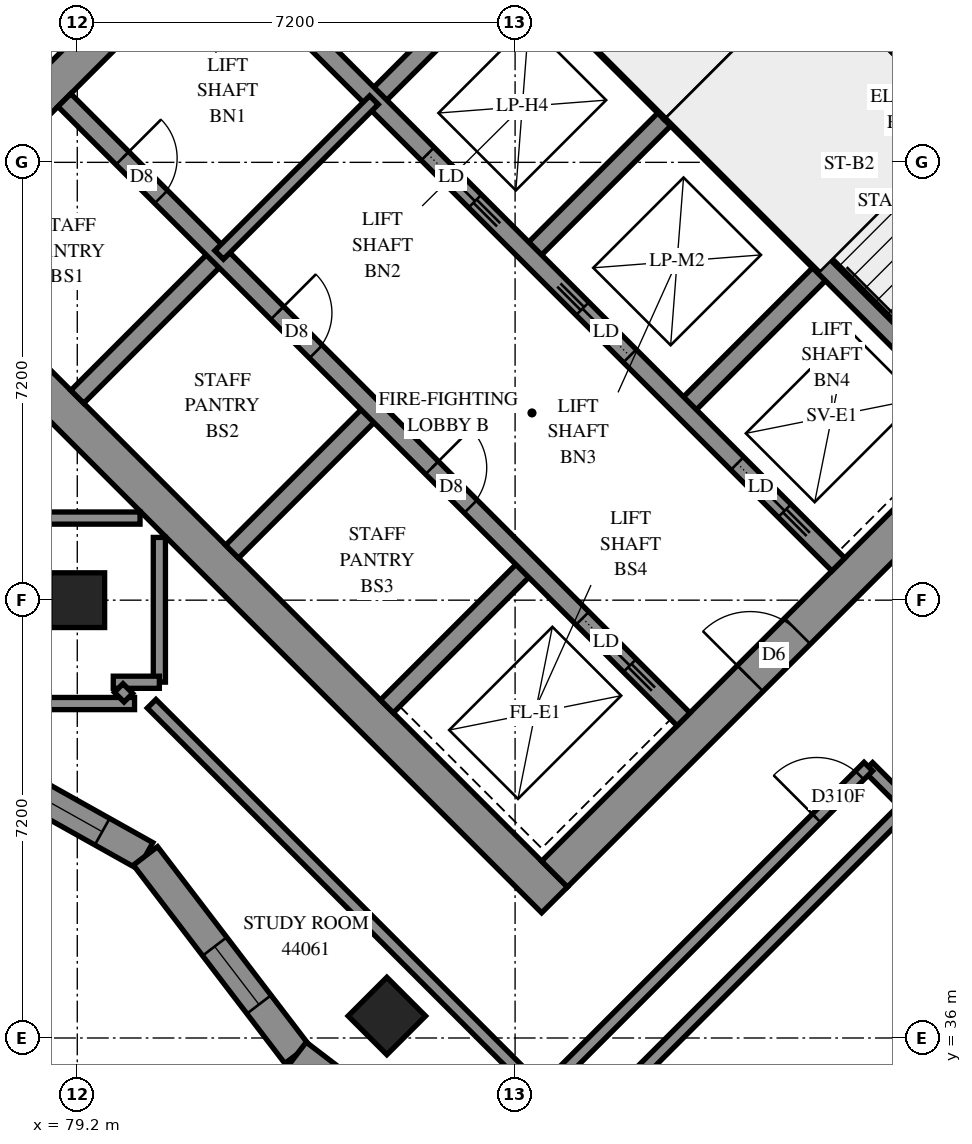
"""IFC4 building model, lengths in metres.
Left out: names, types, materials, properties, quantities, classifications, styles, units other than length and angle.
Written with IfcOpenShell. Run it as: python <this file> out.ifc"""

import sys

from ifc_helpers import new_model, si_unit, direction, frame, frame_2d, origin, origin_2d, place, context, subcontext, project, spatial, polyline, rectangle, outline, extrude, element, fill, save


model = new_model("IFC4")
c1 = context("Model", 3, precision=1e-05, world=origin(), true_north=direction((0.0, 1.0)))
c2 = subcontext(c1, "Body", "Model", "MODEL_VIEW")
j1 = project(units=[si_unit("LENGTHUNIT", "METRE"), si_unit("PLANEANGLEUNIT", "RADIAN")], contexts=[c1])
p1 = place(None, origin())
s1 = spatial("IfcSite", under=j1, at=p1, CompositionType="ELEMENT")
p2 = place(p1, origin())
s2 = spatial("IfcBuilding", under=s1, at=p2, CompositionType="ELEMENT")
p3 = place(p2, frame((0.0, 0.0, 162.6)))
s3 = spatial("IfcBuildingStorey", under=s2, at=p3, CompositionType="ELEMENT", Elevation=162.6)
for number, where, z_axis, x_axis in (
    (1, (79.2, 43.2, 0.0), (0.0, 0.0, 1.0), (1.0, 0.0, 0.0)),
    (2, (84.291, 36.362, 0.0), (0.0, 0.0, 1.0), (0.707, -0.707, 0.0)),
):
    element("IfcColumn", number, at=place(p3, frame(where, z_axis=z_axis, x_axis=x_axis)), inside=s3, PredefinedType="COLUMN", context=c2, shape_type="SweptSolid", body=[
        extrude(rectangle(XDim=0.9, YDim=0.9, at=origin_2d()), origin(), (0.0, 0.0, 1.0), 3.1),
    ])
p4 = place(p3, frame((76.018, 49.302, -0.3), z_axis=(0.0, 0.0, 1.0), x_axis=(0.7071067812, -0.7071067812, 0.0)))
e3 = element("IfcWall", 3, at=p4, inside=s3, PredefinedType="SHEAR", context=c2, shape_type="SweptSolid", body=[
    extrude(rectangle(XDim=15.6, YDim=0.6, at=frame_2d((7.8, 0.0))), origin(), (0.0, 0.0, 1.0), 2.7),
])
p5 = place(p3, frame((86.625, 59.908, -0.3), z_axis=(0.0, 0.0, 1.0), x_axis=(0.7071067812, -0.7071067812, 0.0)))
e4 = element("IfcWall", 4, at=p5, inside=s3, PredefinedType="SHEAR", context=c2, shape_type="SweptSolid", body=[
    extrude(rectangle(XDim=15.6, YDim=0.6, at=frame_2d((7.8, 0.0))), origin(), (0.0, 0.0, 1.0), 2.7),
])
p6 = place(p5, frame((10.6, 0.0, 0.3)))
e5 = element("IfcOpeningElement", 5, at=p6, cuts=e4, PredefinedType="OPENING", context=c2, shape_type="SweptSolid", body=[
    extrude(rectangle(XDim=0.8, YDim=2.1, at=frame_2d((0.4, 1.05))), frame((0.0, 0.31, 0.0), z_axis=(0.0, -1.0, 0.0), x_axis=(1.0, 0.0, 0.0)), (0.0, 0.0, 1.0), 0.62),
])
p7 = place(p3, frame((76.442, 49.302, -0.3), z_axis=(0.0, 0.0, 1.0), x_axis=(0.7071067812, 0.7071067812, 0.0)))
e6 = element("IfcWall", 6, at=p7, inside=s3, PredefinedType="SHEAR", context=c2, shape_type="SweptSolid", body=[
    extrude(rectangle(XDim=14.4, YDim=0.6, at=frame_2d((7.2, 0.0))), origin(), (0.0, 0.0, 1.0), 2.7),
])
p8 = place(p7, frame((4.55, 0.0, 0.3)))
e7 = element("IfcOpeningElement", 7, at=p8, cuts=e6, PredefinedType="OPENING", context=c2, shape_type="SweptSolid", body=[
    extrude(rectangle(XDim=1.1, YDim=2.1, at=frame_2d((0.55, 1.05))), frame((0.0, 0.31, 0.0), z_axis=(0.0, -1.0, 0.0), x_axis=(1.0, 0.0, 0.0)), (0.0, 0.0, 1.0), 0.62),
])
p9 = place(p7, frame((11.35, 0.0, 0.3)))
e8 = element("IfcOpeningElement", 8, at=p9, cuts=e6, PredefinedType="OPENING", context=c2, shape_type="SweptSolid", body=[
    extrude(rectangle(XDim=1.1, YDim=2.1, at=frame_2d((0.55, 1.05))), frame((0.0, 0.31, 0.0), z_axis=(0.0, -1.0, 0.0), x_axis=(1.0, 0.0, 0.0)), (0.0, 0.0, 1.0), 0.62),
])
p10 = place(p3, frame((87.049, 38.695, -0.3), z_axis=(0.0, 0.0, 1.0), x_axis=(0.7071067812, 0.7071067812, 0.0)))
e9 = element("IfcWall", 9, at=p10, inside=s3, PredefinedType="SHEAR", context=c2, shape_type="SweptSolid", body=[
    extrude(rectangle(XDim=14.4, YDim=0.6, at=frame_2d((7.2, 0.0))), origin(), (0.0, 0.0, 1.0), 2.7),
])
p11 = place(p10, frame((4.55, 0.0, 0.3)))
e10 = element("IfcOpeningElement", 10, at=p11, cuts=e9, PredefinedType="OPENING", context=c2, shape_type="SweptSolid", body=[
    extrude(rectangle(XDim=1.1, YDim=2.1, at=frame_2d((0.55, 1.05))), frame((0.0, 0.31, 0.0), z_axis=(0.0, -1.0, 0.0), x_axis=(1.0, 0.0, 0.0)), (0.0, 0.0, 1.0), 0.62),
])
p12 = place(p10, frame((11.35, 0.0, 0.3)))
e11 = element("IfcOpeningElement", 11, at=p12, cuts=e9, PredefinedType="OPENING", context=c2, shape_type="SweptSolid", body=[
    extrude(rectangle(XDim=1.1, YDim=2.1, at=frame_2d((0.55, 1.05))), frame((0.0, 0.31, 0.0), z_axis=(0.0, -1.0, 0.0), x_axis=(1.0, 0.0, 0.0)), (0.0, 0.0, 1.0), 0.62),
])
for number, where, z_axis, x_axis in (
    (12, (79.2, 46.544, 0.0), (0.0, 0.0, 1.0), (0.707, 0.707, 0.0)),
    (13, (84.079, 51.423, 0.0), (0.0, 0.0, 1.0), (0.707, 0.707, 0.0)),
):
    element("IfcWall", number, at=place(p3, frame(where, z_axis=z_axis, x_axis=x_axis)), inside=s3, PredefinedType="SOLIDWALL", context=c2, shape_type="SweptSolid", body=[
        extrude(rectangle(XDim=3.3, YDim=0.3, at=frame_2d((1.65, 0.0))), origin(), (0.0, 0.0, 1.0), 3.1),
    ])
p13 = place(p3, frame((81.746, 43.999, 0.0), z_axis=(0.0, 0.0, 1.0), x_axis=(0.7071067812, 0.7071067812, 0.0)))
e14 = element("IfcWall", 14, at=p13, inside=s3, PredefinedType="SOLIDWALL", context=c2, shape_type="SweptSolid", body=[
    extrude(rectangle(XDim=3.3, YDim=0.3, at=frame_2d((1.65, 0.0))), origin(), (0.0, 0.0, 1.0), 3.1),
])
p14 = place(p3, frame((86.625, 48.878, 0.0), z_axis=(0.0, 0.0, 1.0), x_axis=(0.7071067812, 0.7071067812, 0.0)))
e15 = element("IfcWall", 15, at=p14, inside=s3, PredefinedType="SOLIDWALL", context=c2, shape_type="SweptSolid", body=[
    extrude(rectangle(XDim=3.3, YDim=0.3, at=frame_2d((1.65, 0.0))), origin(), (0.0, 0.0, 1.0), 3.1),
])
p15 = place(p3, frame((84.291, 41.453, 0.0), z_axis=(0.0, 0.0, 1.0), x_axis=(0.7071067812, 0.7071067812, 0.0)))
e16 = element("IfcWall", 16, at=p15, inside=s3, PredefinedType="SOLIDWALL", context=c2, shape_type="SweptSolid", body=[
    extrude(rectangle(XDim=3.3, YDim=0.3, at=frame_2d((1.65, 0.0))), origin(), (0.0, 0.0, 1.0), 3.1),
])
p16 = place(p3, frame((89.17, 46.332, 0.0), z_axis=(0.0, 0.0, 1.0), x_axis=(0.7071067812, 0.7071067812, 0.0)))
e17 = element("IfcWall", 17, at=p16, inside=s3, PredefinedType="SOLIDWALL", context=c2, shape_type="SweptSolid", body=[
    extrude(rectangle(XDim=3.3, YDim=0.3, at=frame_2d((1.65, 0.0))), origin(), (0.0, 0.0, 1.0), 3.1),
])
p17 = place(p3, frame((78.988, 51.423, 0.0), z_axis=(0.0, 0.0, 1.0), x_axis=(0.7071067812, -0.7071067812, 0.0)))
e18 = element("IfcWall", 18, at=p17, inside=s3, PredefinedType="SOLIDWALL", context=c2, shape_type="SweptSolid", body=[
    extrude(rectangle(XDim=14.4, YDim=0.3, at=frame_2d((7.2, 0.0))), origin(), (0.0, 0.0, 1.0), 3.1),
])
p18 = place(p17, frame((1.35, 0.0, 0.0)))
e19 = element("IfcOpeningElement", 19, at=p18, cuts=e18, PredefinedType="OPENING", context=c2, shape_type="SweptSolid", body=[
    extrude(rectangle(XDim=0.9, YDim=2.1, at=frame_2d((0.45, 1.05))), frame((0.0, 0.16, 0.0), z_axis=(0.0, -1.0, 0.0), x_axis=(1.0, 0.0, 0.0)), (0.0, 0.0, 1.0), 0.32),
])
p19 = place(p17, frame((4.95, 0.0, 0.0)))
e20 = element("IfcOpeningElement", 20, at=p19, cuts=e18, PredefinedType="OPENING", context=c2, shape_type="SweptSolid", body=[
    extrude(rectangle(XDim=0.9, YDim=2.1, at=frame_2d((0.45, 1.05))), frame((0.0, 0.16, 0.0), z_axis=(0.0, -1.0, 0.0), x_axis=(1.0, 0.0, 0.0)), (0.0, 0.0, 1.0), 0.32),
])
p20 = place(p17, frame((8.55, 0.0, 0.0)))
e21 = element("IfcOpeningElement", 21, at=p20, cuts=e18, PredefinedType="OPENING", context=c2, shape_type="SweptSolid", body=[
    extrude(rectangle(XDim=0.9, YDim=2.1, at=frame_2d((0.45, 1.05))), frame((0.0, 0.16, 0.0), z_axis=(0.0, -1.0, 0.0), x_axis=(1.0, 0.0, 0.0)), (0.0, 0.0, 1.0), 0.32),
])
p21 = place(p17, frame((12.05, 0.0, 0.0)))
e22 = element("IfcOpeningElement", 22, at=p21, cuts=e18, PredefinedType="OPENING", context=c2, shape_type="SweptSolid", body=[
    extrude(rectangle(XDim=1.1, YDim=2.1, at=frame_2d((0.55, 1.05))), frame((0.0, 0.16, 0.0), z_axis=(0.0, -1.0, 0.0), x_axis=(1.0, 0.0, 0.0)), (0.0, 0.0, 1.0), 0.32),
])
p22 = place(p3, frame((81.534, 53.969, 0.0), z_axis=(0.0, 0.0, 1.0), x_axis=(0.707103309, -0.7071102534, 0.0)))
e23 = element("IfcWall", 23, at=p22, inside=s3, PredefinedType="SOLIDWALL", context=c2, shape_type="SweptSolid", body=[
    extrude(rectangle(XDim=14.4, YDim=0.3, at=frame_2d((7.2, 0.0))), origin(), (0.0, 0.0, 1.0), 3.1),
])
p23 = place(p22, frame((1.25, 0.0, 0.0)))
e24 = element("IfcOpeningElement", 24, at=p23, cuts=e23, PredefinedType="OPENING", context=c2, shape_type="SweptSolid", body=[
    extrude(rectangle(XDim=1.1, YDim=2.1, at=frame_2d((0.55, 1.05))), frame((0.0, 0.16, 0.0), z_axis=(0.0, -1.0, 0.0), x_axis=(1.0, 0.0, 0.0)), (0.0, 0.0, 1.0), 0.32),
])
p24 = place(p22, frame((4.85, 0.0, 0.0)))
e25 = element("IfcOpeningElement", 25, at=p24, cuts=e23, PredefinedType="OPENING", context=c2, shape_type="SweptSolid", body=[
    extrude(rectangle(XDim=1.1, YDim=2.1, at=frame_2d((0.55, 1.05))), frame((0.0, 0.16, 0.0), z_axis=(0.0, -1.0, 0.0), x_axis=(1.0, 0.0, 0.0)), (0.0, 0.0, 1.0), 0.32),
])
p25 = place(p22, frame((8.45, 0.0, 0.0)))
e26 = element("IfcOpeningElement", 26, at=p25, cuts=e23, PredefinedType="OPENING", context=c2, shape_type="SweptSolid", body=[
    extrude(rectangle(XDim=1.1, YDim=2.1, at=frame_2d((0.55, 1.05))), frame((0.0, 0.16, 0.0), z_axis=(0.0, -1.0, 0.0), x_axis=(1.0, 0.0, 0.0)), (0.0, 0.0, 1.0), 0.32),
])
p26 = place(p22, frame((12.05, 0.0, 0.0)))
e27 = element("IfcOpeningElement", 27, at=p26, cuts=e23, PredefinedType="OPENING", context=c2, shape_type="SweptSolid", body=[
    extrude(rectangle(XDim=1.1, YDim=2.1, at=frame_2d((0.55, 1.05))), frame((0.0, 0.16, 0.0), z_axis=(0.0, -1.0, 0.0), x_axis=(1.0, 0.0, 0.0)), (0.0, 0.0, 1.0), 0.32),
])
for number, where, z_axis, x_axis in (
    (28, (83.867, 56.302, 0.0), (0.0, 0.0, 1.0), (0.707, -0.707, 0.0)),
    (29, (88.958, 51.211, 0.0), (0.0, 0.0, 1.0), (0.707, -0.707, 0.0)),
):
    element("IfcWall", number, at=place(p3, frame(where, z_axis=z_axis, x_axis=x_axis)), inside=s3, PredefinedType="SOLIDWALL", context=c2, shape_type="SweptSolid", body=[
        extrude(rectangle(XDim=7.2, YDim=0.3, at=frame_2d((3.6, 0.0))), origin(), (0.0, 0.0, 1.0), 3.1),
    ])
p27 = place(p3, frame((88.958, 51.211, 0.0), z_axis=(0.0, 0.0, 1.0), x_axis=(0.7071067812, 0.7071067812, 0.0)))
e30 = element("IfcWall", 30, at=p27, inside=s3, PredefinedType="SOLIDWALL", context=c2, shape_type="SweptSolid", body=[
    extrude(rectangle(XDim=4.2, YDim=0.3, at=frame_2d((2.1, 0.0))), origin(), (0.0, 0.0, 1.0), 3.1),
])
p28 = place(p3, frame((76.585, 41.088, 0.0), z_axis=(0.0, 0.0, 1.0), x_axis=(0.8724681922, -0.4886709053, 0.0)))
e31 = element("IfcWall", 31, at=p28, inside=s3, PredefinedType="SOLIDWALL", context=c2, shape_type="SweptSolid", body=[
    extrude(outline(polyline([(0.024, -0.25), (4.231, -0.25), (4.335, 0.25), (-0.024, 0.25), (0.024, -0.25)])), origin(), (0.0, 0.0, 1.0), 3.1),
])
p29 = place(p28, frame((0.727, 0.0, 0.45)))
e32 = element("IfcOpeningElement", 32, at=p29, cuts=e31, PredefinedType="OPENING", context=c2, shape_type="SweptSolid", body=[
    extrude(rectangle(XDim=1.2, YDim=2.5, at=frame_2d((0.6, 1.25))), frame((0.0, 0.26, 0.0), z_axis=(0.0, -1.0, 0.0), x_axis=(1.0, 0.0, 0.0)), (0.0, 0.0, 1.0), 0.52),
])
p30 = place(p28, frame((2.268, 0.0, 0.45)))
e33 = element("IfcOpeningElement", 33, at=p30, cuts=e31, PredefinedType="OPENING", context=c2, shape_type="SweptSolid", body=[
    extrude(rectangle(XDim=1.2, YDim=2.5, at=frame_2d((0.6, 1.25))), frame((0.0, 0.26, 0.0), z_axis=(0.0, -1.0, 0.0), x_axis=(1.0, 0.0, 0.0)), (0.0, 0.0, 1.0), 0.52),
])
p31 = place(p3, frame((80.322, 38.995, 0.0), z_axis=(0.0, 0.0, 1.0), x_axis=(0.6070711239, -0.7946475008, 0.0)))
e34 = element("IfcWall", 34, at=p31, inside=s3, PredefinedType="SOLIDWALL", context=c2, shape_type="SweptSolid", body=[
    extrude(outline(polyline([(0.052, -0.25), (4.138, -0.25), (4.071, 0.25), (-0.052, 0.25), (0.052, -0.25)])), origin(), (0.0, 0.0, 1.0), 3.1),
])
p32 = place(p31, frame((1.875, 0.0, 0.45)))
e35 = element("IfcOpeningElement", 35, at=p32, cuts=e34, PredefinedType="OPENING", context=c2, shape_type="SweptSolid", body=[
    extrude(rectangle(XDim=1.2, YDim=2.5, at=frame_2d((0.6, 1.25))), frame((0.0, 0.26, 0.0), z_axis=(0.0, -1.0, 0.0), x_axis=(1.0, 0.0, 0.0)), (0.0, 0.0, 1.0), 0.52),
])
p33 = place(p3, frame((82.813, 35.733, 0.0), z_axis=(0.0, 0.0, 1.0), x_axis=(0.7946501833, -0.6070676125, 0.0)))
e36 = element("IfcWall", 36, at=p33, inside=s3, PredefinedType="SOLIDWALL", context=c2, shape_type="SweptSolid", body=[
    extrude(outline(polyline([(-0.034, -0.25), (4.053, -0.25), (4.12, 0.25), (0.034, 0.25), (-0.034, -0.25)])), origin(), (0.0, 0.0, 1.0), 3.1),
])
p34 = place(p33, frame((0.846, 0.0, 0.45)))
e37 = element("IfcOpeningElement", 37, at=p34, cuts=e36, PredefinedType="OPENING", context=c2, shape_type="SweptSolid", body=[
    extrude(rectangle(XDim=2.8, YDim=2.5, at=frame_2d((1.4, 1.25))), frame((0.0, 0.26, 0.0), z_axis=(0.0, -1.0, 0.0), x_axis=(1.0, 0.0, 0.0)), (0.0, 0.0, 1.0), 0.52),
])
p35 = place(p3, frame((91.313, 53.354, 0.0), z_axis=(0.0, 0.0, 1.0), x_axis=(0.7071067812, -0.7071067812, 0.0)))
e38 = element("IfcWall", 38, at=p35, inside=s3, PredefinedType="PARTITIONING", context=c2, shape_type="SweptSolid", body=[
    extrude(rectangle(XDim=5.65, YDim=0.15, at=frame_2d((2.825, 0.0))), origin(), (0.0, 0.0, 1.0), 3.1),
])
p36 = place(p3, frame((81.534, 48.878, 0.0), z_axis=(0.0, 0.0, 1.0), x_axis=(0.707092892, 0.7071206701, 0.0)))
e39 = element("IfcWall", 39, at=p36, inside=s3, PredefinedType="PARTITIONING", context=c2, shape_type="SweptSolid", body=[
    extrude(rectangle(XDim=3.6, YDim=0.2, at=frame_2d((1.8, 0.0))), origin(), (0.0, 0.0, 1.0), 3.1),
])
p37 = place(p3, frame((92.209, 40.459, 0.0), z_axis=(0.0, 0.0, 1.0), x_axis=(0.7071067812, -0.7071067812, 0.0)))
e40 = element("IfcWall", 40, at=p37, inside=s3, PredefinedType="PARTITIONING", context=c2, shape_type="SweptSolid", body=[
    extrude(rectangle(XDim=11.698, YDim=0.2, at=frame_2d((5.849, 0.0))), origin(), (0.0, 0.0, 1.0), 3.1),
])
p38 = place(p37, frame((2.908, 0.0, 0.0)))
e41 = element("IfcOpeningElement", 41, at=p38, cuts=e40, PredefinedType="OPENING", context=c2, shape_type="SweptSolid", body=[
    extrude(rectangle(XDim=0.9, YDim=2.1, at=frame_2d((0.45, 1.05))), frame((0.0, 0.11, 0.0), z_axis=(0.0, -1.0, 0.0), x_axis=(1.0, 0.0, 0.0)), (0.0, 0.0, 1.0), 0.22),
])
p39 = place(p37, frame((10.181, 0.0, 0.0)))
e42 = element("IfcOpeningElement", 42, at=p39, cuts=e40, PredefinedType="OPENING", context=c2, shape_type="SweptSolid", body=[
    extrude(rectangle(XDim=0.9, YDim=2.1, at=frame_2d((0.45, 1.05))), frame((0.0, 0.11, 0.0), z_axis=(0.0, -1.0, 0.0), x_axis=(1.0, 0.0, 0.0)), (0.0, 0.0, 1.0), 0.22),
])
p40 = place(p3, frame((86.332, 33.309, 0.0), z_axis=(0.0, 0.0, 1.0), x_axis=(0.7072098544, 0.7070036929, 0.0)))
e43 = element("IfcWall", 43, at=p40, inside=s3, PredefinedType="PARTITIONING", context=c2, shape_type="SweptSolid", body=[
    extrude(rectangle(XDim=9.216, YDim=0.2, at=frame_2d((4.608, 0.0))), origin(), (0.0, 0.0, 1.0), 3.1),
])
p41 = place(p3, frame((80.423, 41.497, 0.0), z_axis=(0.0, 0.0, 1.0), x_axis=(0.7071067812, -0.7071067812, 0.0)))
e44 = element("IfcWall", 44, at=p41, inside=s3, PredefinedType="PARTITIONING", context=c2, shape_type="SweptSolid", body=[
    extrude(rectangle(XDim=9.065, YDim=0.2, at=frame_2d((4.532, 0.0))), origin(), (0.0, 0.0, 1.0), 3.1),
])
p42 = place(p3, frame((86.837, 35.091, 0.0), z_axis=(0.0, 0.0, 1.0), x_axis=(0.7071067812, 0.7071067812, 0.0)))
e45 = element("IfcWall", 45, at=p42, inside=s3, PredefinedType="PARTITIONING", context=c2, shape_type="SweptSolid", body=[
    extrude(rectangle(XDim=7.597, YDim=0.2, at=frame_2d((3.799, 0.0))), origin(), (0.0, 0.0, 1.0), 3.1),
])
p43 = place(p42, frame((6.395, 0.0, 0.0)))
e46 = element("IfcOpeningElement", 46, at=p43, cuts=e45, PredefinedType="OPENING", context=c2, shape_type="SweptSolid", body=[
    extrude(rectangle(XDim=1.0, YDim=2.1, at=frame_2d((0.5, 1.05))), frame((0.0, 0.11, 0.0), z_axis=(0.0, -1.0, 0.0), x_axis=(1.0, 0.0, 0.0)), (0.0, 0.0, 1.0), 0.22),
])
p44 = place(p3, frame((77.502, 41.5, 0.0), z_axis=(0.0, 0.0, 1.0), x_axis=(1.0, 0.0, 0.0)))
e47 = element("IfcWall", 47, at=p44, inside=s3, PredefinedType="PARTITIONING", context=c2, shape_type="SweptSolid", body=[
    extrude(rectangle(XDim=2.64, YDim=0.2, at=frame_2d((1.32, 0.0))), origin(), (0.0, 0.0, 1.0), 3.1),
])
for number, where, z_axis, x_axis in (
    (48, (80.55, 41.852, 0.0), (0.0, 0.0, 1.0), (0.0, 1.0, 0.0)),
    (49, (77.852, 44.55, 0.0), (0.0, 0.0, 1.0), (1.0, 0.0, 0.0)),
):
    element("IfcWall", number, at=place(p3, frame(where, z_axis=z_axis, x_axis=x_axis)), inside=s3, PredefinedType="PARTITIONING", context=c2, shape_type="SweptSolid", body=[
        extrude(rectangle(XDim=2.38, YDim=0.2, at=frame_2d((1.19, 0.0))), origin(), (0.0, 0.0, 1.0), 3.1),
    ])
p45 = place(p3, frame((79.792, 41.85, 0.0), z_axis=(0.0, 0.0, 1.0), x_axis=(1.0, 0.0, 0.0)))
e50 = element("IfcWall", 50, at=p45, inside=s3, PredefinedType="PARTITIONING", context=c2, shape_type="SweptSolid", body=[
    extrude(rectangle(XDim=0.758, YDim=0.2, at=frame_2d((0.379, 0.0))), origin(), (0.0, 0.0, 1.0), 3.1),
])
p46 = place(p3, frame((79.881, 41.755, 0.0), z_axis=(0.0, 0.0, 1.0), x_axis=(0.7071067812, -0.7071067812, 0.0)))
e51 = element("IfcWall", 51, at=p46, inside=s3, PredefinedType="PARTITIONING", context=c2, shape_type="SweptSolid", body=[
    extrude(rectangle(XDim=0.225, YDim=0.2, at=frame_2d((0.113, 0.0))), origin(), (0.0, 0.0, 1.0), 3.1),
])
p47 = place(p30, origin())
e52 = element("IfcWindow", 52, at=p47, inside=s3, PartitioningType="SINGLE_PANEL", PredefinedType="WINDOW", context=c2, shape_type="SweptSolid", body=[
    extrude(rectangle(XDim=1.2, YDim=2.5, at=frame_2d((0.6, 1.25))), frame((0.0, 0.18, 0.0), z_axis=(0.0, -1.0, 0.0), x_axis=(1.0, 0.0, 0.0)), (0.0, 0.0, 1.0), 0.06),
])
fill(e33, e52)
p48 = place(p32, origin())
e53 = element("IfcWindow", 53, at=p48, inside=s3, PartitioningType="SINGLE_PANEL", PredefinedType="WINDOW", context=c2, shape_type="SweptSolid", body=[
    extrude(rectangle(XDim=1.2, YDim=2.5, at=frame_2d((0.6, 1.25))), frame((0.0, 0.18, 0.0), z_axis=(0.0, -1.0, 0.0), x_axis=(1.0, 0.0, 0.0)), (0.0, 0.0, 1.0), 0.06),
])
fill(e35, e53)
p49 = place(p11, origin())
e54 = element("IfcDoor", 54, at=p49, inside=s3, OperationType="DOUBLE_DOOR_SINGLE_SWING", PredefinedType="DOOR", context=c2, shape_type="SweptSolid", body=[
    extrude(rectangle(XDim=1.1, YDim=2.1, at=frame_2d((0.55, 1.05))), frame((0.0, 0.025, 0.0), z_axis=(0.0, -1.0, 0.0), x_axis=(1.0, 0.0, 0.0)), (0.0, 0.0, 1.0), 0.05),
])
fill(e10, e54)
p50 = place(p18, origin())
e55 = element("IfcDoor", 55, at=p50, inside=s3, OperationType="SINGLE_SWING_LEFT", PredefinedType="DOOR", context=c2, shape_type="SweptSolid", body=[
    extrude(rectangle(XDim=0.9, YDim=2.1, at=frame_2d((0.45, 1.05))), frame((0.0, 0.025, 0.0), z_axis=(0.0, -1.0, 0.0), x_axis=(1.0, 0.0, 0.0)), (0.0, 0.0, 1.0), 0.05),
])
fill(e19, e55)
p51 = place(p19, origin())
e56 = element("IfcDoor", 56, at=p51, inside=s3, OperationType="SINGLE_SWING_LEFT", PredefinedType="DOOR", context=c2, shape_type="SweptSolid", body=[
    extrude(rectangle(XDim=0.9, YDim=2.1, at=frame_2d((0.45, 1.05))), frame((0.0, 0.025, 0.0), z_axis=(0.0, -1.0, 0.0), x_axis=(1.0, 0.0, 0.0)), (0.0, 0.0, 1.0), 0.05),
])
fill(e20, e56)
p52 = place(p20, origin())
e57 = element("IfcDoor", 57, at=p52, inside=s3, OperationType="SINGLE_SWING_LEFT", PredefinedType="DOOR", context=c2, shape_type="SweptSolid", body=[
    extrude(rectangle(XDim=0.9, YDim=2.1, at=frame_2d((0.45, 1.05))), frame((0.0, 0.025, 0.0), z_axis=(0.0, -1.0, 0.0), x_axis=(1.0, 0.0, 0.0)), (0.0, 0.0, 1.0), 0.05),
])
fill(e21, e57)
p53 = place(p21, origin())
e58 = element("IfcDoor", 58, at=p53, inside=s3, OperationType="SLIDING_TO_RIGHT", PredefinedType="DOOR", context=c2, shape_type="SweptSolid", body=[
    extrude(rectangle(XDim=1.1, YDim=2.1, at=frame_2d((0.55, 1.05))), frame((0.0, 0.025, 0.0), z_axis=(0.0, -1.0, 0.0), x_axis=(1.0, 0.0, 0.0)), (0.0, 0.0, 1.0), 0.05),
])
fill(e22, e58)
p54 = place(p24, origin())
e59 = element("IfcDoor", 59, at=p54, inside=s3, OperationType="SLIDING_TO_RIGHT", PredefinedType="DOOR", context=c2, shape_type="SweptSolid", body=[
    extrude(rectangle(XDim=1.1, YDim=2.1, at=frame_2d((0.55, 1.05))), frame((0.0, 0.025, 0.0), z_axis=(0.0, -1.0, 0.0), x_axis=(1.0, 0.0, 0.0)), (0.0, 0.0, 1.0), 0.05),
])
fill(e25, e59)
p55 = place(p25, origin())
e60 = element("IfcDoor", 60, at=p55, inside=s3, OperationType="SLIDING_TO_LEFT", PredefinedType="DOOR", context=c2, shape_type="SweptSolid", body=[
    extrude(rectangle(XDim=1.1, YDim=2.1, at=frame_2d((0.55, 1.05))), frame((0.0, 0.025, 0.0), z_axis=(0.0, -1.0, 0.0), x_axis=(1.0, 0.0, 0.0)), (0.0, 0.0, 1.0), 0.05),
])
fill(e26, e60)
p56 = place(p26, origin())
e61 = element("IfcDoor", 61, at=p56, inside=s3, OperationType="SLIDING_TO_RIGHT", PredefinedType="DOOR", context=c2, shape_type="SweptSolid", body=[
    extrude(rectangle(XDim=1.1, YDim=2.1, at=frame_2d((0.55, 1.05))), frame((0.0, 0.025, 0.0), z_axis=(0.0, -1.0, 0.0), x_axis=(1.0, 0.0, 0.0)), (0.0, 0.0, 1.0), 0.05),
])
fill(e27, e61)
p57 = place(p43, origin())
e62 = element("IfcDoor", 62, at=p57, inside=s3, OperationType="SINGLE_SWING_LEFT", PredefinedType="DOOR", context=c2, shape_type="SweptSolid", body=[
    extrude(rectangle(XDim=1.0, YDim=2.1, at=frame_2d((0.5, 1.05))), frame((0.0, 0.025, 0.0), z_axis=(0.0, -1.0, 0.0), x_axis=(1.0, 0.0, 0.0)), (0.0, 0.0, 1.0), 0.05),
])
fill(e46, e62)
save(model, sys.argv[1])
